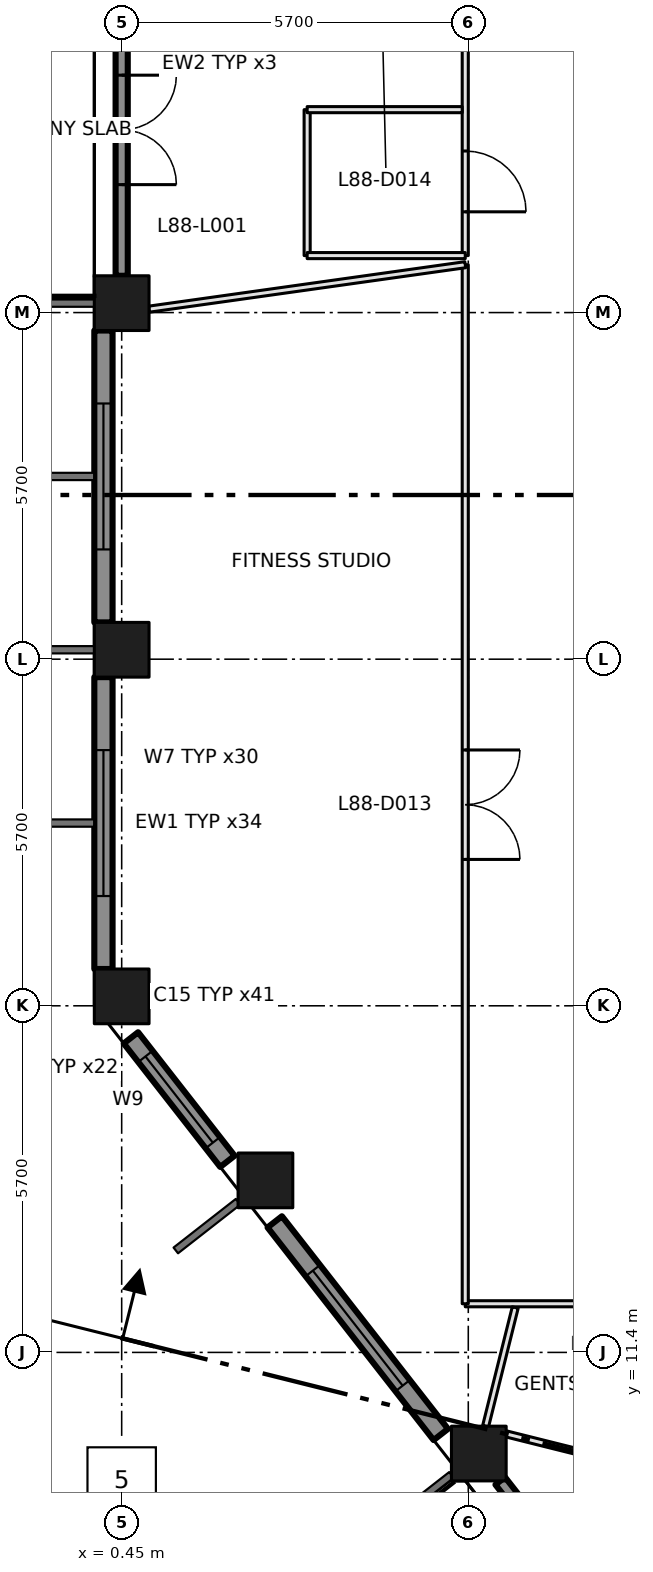
"""IFC4 building model, lengths in metres.
Left out: names, types, materials, properties, quantities, classifications, styles, units other than length and angle.
Written with IfcOpenShell. Run it as: python <this file> out.ifc"""

import sys

from ifc_helpers import new_model, si_unit, direction, frame, frame_2d, origin, origin_2d, place, context, subcontext, project, spatial, rectangle, extrude, element, fill, save


model = new_model("IFC4")
c1 = context("Model", 3, precision=1e-05, world=origin(), true_north=direction((0.0, 1.0)))
c2 = subcontext(c1, "Body", "Model", "MODEL_VIEW")
j1 = project(units=[si_unit("LENGTHUNIT", "METRE"), si_unit("PLANEANGLEUNIT", "RADIAN")], contexts=[c1])
p1 = place(None, origin())
s1 = spatial("IfcSite", under=j1, at=p1, CompositionType="ELEMENT")
p2 = place(p1, origin())
s2 = spatial("IfcBuilding", under=s1, at=p2, CompositionType="ELEMENT")
p3 = place(p2, frame((0.0, 0.0, 383.4)))
s3 = spatial("IfcBuildingStorey", under=s2, at=p3, CompositionType="ELEMENT", Elevation=383.4)
for number, where, z_axis, x_axis in (
    (1, (0.45, 17.255, 0.0), (0.0, 0.0, 1.0), (1.0, 0.0, 0.0)),
    (2, (0.45, 22.955, 0.0), (0.0, 0.0, 1.0), (1.0, 0.0, 0.0)),
    (3, (0.45, 28.655, 0.0), (0.0, 0.0, 1.0), (1.0, 0.0, 0.0)),
    (4, (6.323, 9.737, 0.0), (0.0, 0.0, 1.0), (1.0, 0.0, 0.0)),
    (5, (2.814, 14.229, 0.0), (0.0, 0.0, 1.0), (1.0, 0.0, 0.0)),
):
    element("IfcColumn", number, at=place(p3, frame(where, z_axis=z_axis, x_axis=x_axis)), inside=s3, PredefinedType="COLUMN", context=c2, shape_type="SweptSolid", body=[
        extrude(rectangle(XDim=0.9, YDim=0.9, at=origin_2d()), origin(), (0.0, 0.0, 1.0), 4.2),
    ])
p4 = place(p3, frame((0.45, 33.904, 0.0), z_axis=(0.0, 0.0, 1.0), x_axis=(0.0, -1.0, 0.0)))
e6 = element("IfcWall", 6, at=p4, inside=s3, PredefinedType="SOLIDWALL", context=c2, shape_type="SweptSolid", body=[
    extrude(rectangle(XDim=4.799, YDim=0.2, at=frame_2d((2.399, 0.0))), origin(), (0.0, 0.0, 1.0), 3.2),
])
p5 = place(p4, frame((1.5, 0.0, 0.0)))
e7 = element("IfcOpeningElement", 7, at=p5, cuts=e6, PredefinedType="OPENING", context=c2, shape_type="SweptSolid", body=[
    extrude(rectangle(XDim=1.8, YDim=2.9, at=frame_2d((0.9, 1.45))), frame((0.0, 0.11, 0.0), z_axis=(0.0, -1.0, 0.0), x_axis=(1.0, 0.0, 0.0)), (0.0, 0.0, 1.0), 0.22),
])
p6 = place(p3, frame((-0.88, 34.185, 0.0), z_axis=(0.0, 0.0, 1.0), x_axis=(0.0, -1.0, 0.0)))
e8 = element("IfcWall", 8, at=p6, inside=s3, PredefinedType="SOLIDWALL", context=c2, shape_type="SweptSolid", body=[
    extrude(rectangle(XDim=5.36, YDim=0.4, at=frame_2d((2.68, 0.0))), origin(), (0.0, 0.0, 1.0), 0.3),
])
p7 = place(p3, frame((0.15, 28.205, 0.0), z_axis=(0.0, 0.0, 1.0), x_axis=(0.0, -1.0, 0.0)))
e9 = element("IfcWall", 9, at=p7, inside=s3, PredefinedType="SOLIDWALL", context=c2, shape_type="SweptSolid", body=[
    extrude(rectangle(XDim=4.8, YDim=0.3, at=frame_2d((2.4, 0.0))), origin(), (0.0, 0.0, 1.0), 3.2),
])
p8 = place(p7, frame((1.2, 0.0, 0.8)))
e10 = element("IfcOpeningElement", 10, at=p8, cuts=e9, PredefinedType="OPENING", context=c2, shape_type="SweptSolid", body=[
    extrude(rectangle(XDim=2.4, YDim=2.1, at=frame_2d((1.2, 1.05))), frame((0.0, 0.16, 0.0), z_axis=(0.0, -1.0, 0.0), x_axis=(1.0, 0.0, 0.0)), (0.0, 0.0, 1.0), 0.32),
])
p9 = place(p3, frame((0.15, 22.505, 0.0), z_axis=(0.0, 0.0, 1.0), x_axis=(0.0, -1.0, 0.0)))
e11 = element("IfcWall", 11, at=p9, inside=s3, PredefinedType="SOLIDWALL", context=c2, shape_type="SweptSolid", body=[
    extrude(rectangle(XDim=4.8, YDim=0.3, at=frame_2d((2.4, 0.0))), origin(), (0.0, 0.0, 1.0), 3.2),
])
p10 = place(p9, frame((1.2, 0.0, 0.8)))
e12 = element("IfcOpeningElement", 12, at=p10, cuts=e11, PredefinedType="OPENING", context=c2, shape_type="SweptSolid", body=[
    extrude(rectangle(XDim=2.4, YDim=2.1, at=frame_2d((1.2, 1.05))), frame((0.0, 0.16, 0.0), z_axis=(0.0, -1.0, 0.0), x_axis=(1.0, 0.0, 0.0)), (0.0, 0.0, 1.0), 0.32),
])
p11 = place(p3, frame((0.602, 16.573, 0.0), z_axis=(0.0, 0.0, 1.0), x_axis=(0.61568999437, -0.787988471256, 0.0)))
e13 = element("IfcWall", 13, at=p11, inside=s3, PredefinedType="SOLIDWALL", context=c2, shape_type="SweptSolid", body=[
    extrude(rectangle(XDim=2.577, YDim=0.3, at=frame_2d((1.289, 0.0))), origin(), (0.0, 0.0, 1.0), 3.2),
])
p12 = place(p11, frame((0.388, 0.0, 0.8)))
e14 = element("IfcOpeningElement", 14, at=p12, cuts=e13, PredefinedType="OPENING", context=c2, shape_type="SweptSolid", body=[
    extrude(rectangle(XDim=1.8, YDim=2.1, at=frame_2d((0.9, 1.05))), frame((0.0, 0.16, 0.0), z_axis=(0.0, -1.0, 0.0), x_axis=(1.0, 0.0, 0.0)), (0.0, 0.0, 1.0), 0.32),
])
p13 = place(p3, frame((2.967, 13.547, 0.0), z_axis=(0.0, 0.0, 1.0), x_axis=(0.615486001463, -0.788147817356, 0.0)))
e15 = element("IfcWall", 15, at=p13, inside=s3, PredefinedType="SOLIDWALL", context=c2, shape_type="SweptSolid", body=[
    extrude(rectangle(XDim=4.437, YDim=0.3, at=frame_2d((2.219, 0.0))), origin(), (0.0, 0.0, 1.0), 3.2),
])
p14 = place(p13, frame((1.018, 0.0, 0.8)))
e16 = element("IfcOpeningElement", 16, at=p14, cuts=e15, PredefinedType="OPENING", context=c2, shape_type="SweptSolid", body=[
    extrude(rectangle(XDim=2.4, YDim=2.1, at=frame_2d((1.2, 1.05))), frame((0.0, 0.16, 0.0), z_axis=(0.0, -1.0, 0.0), x_axis=(1.0, 0.0, 0.0)), (0.0, 0.0, 1.0), 0.32),
])
p15 = place(p3, frame((6.675, 9.287, 0.0), z_axis=(0.0, 0.0, 1.0), x_axis=(0.615593109271, -0.788064162247, 0.0)))
e17 = element("IfcWall", 17, at=p15, inside=s3, PredefinedType="SOLIDWALL", context=c2, shape_type="SweptSolid", body=[
    extrude(rectangle(XDim=4.558, YDim=0.2, at=frame_2d((2.279, 0.0))), origin(), (0.0, 0.0, 1.0), 3.2),
])
p16 = place(p15, frame((1.378, 0.0, 0.0)))
e18 = element("IfcOpeningElement", 18, at=p16, cuts=e17, PredefinedType="OPENING", context=c2, shape_type="SweptSolid", body=[
    extrude(rectangle(XDim=1.8, YDim=2.9, at=frame_2d((0.9, 1.45))), frame((0.0, 0.11, 0.0), z_axis=(0.0, -1.0, 0.0), x_axis=(1.0, 0.0, 0.0)), (0.0, 0.0, 1.0), 0.22),
])
p17 = place(p3, frame((6.1, 12.2, 0.0), z_axis=(0.0, 0.0, 1.0), x_axis=(1.0, 0.0, 0.0)))
e19 = element("IfcWall", 19, at=p17, inside=s3, PredefinedType="PARTITIONING", context=c2, shape_type="SweptSolid", body=[
    extrude(rectangle(XDim=3.8, YDim=0.1, at=frame_2d((1.9, 0.0))), origin(), (0.0, 0.0, 1.0), 3.9),
])
p18 = place(p17, frame((2.002, 0.0, 0.0)))
e20 = element("IfcOpeningElement", 20, at=p18, cuts=e19, PredefinedType="OPENING", context=c2, shape_type="SweptSolid", body=[
    extrude(rectangle(XDim=1.0, YDim=2.1, at=frame_2d((0.5, 1.05))), frame((0.0, 0.06, 0.0), z_axis=(0.0, -1.0, 0.0), x_axis=(1.0, 0.0, 0.0)), (0.0, 0.0, 1.0), 0.12),
])
p19 = place(p3, frame((6.1, 29.287, 0.0), z_axis=(0.0, 0.0, 1.0), x_axis=(0.0, -1.0, 0.0)))
e21 = element("IfcWall", 21, at=p19, inside=s3, PredefinedType="PARTITIONING", context=c2, shape_type="SweptSolid", body=[
    extrude(rectangle(XDim=17.087, YDim=0.1, at=frame_2d((8.543, 0.0))), origin(), (0.0, 0.0, 1.0), 3.9),
])
p20 = place(p19, frame((7.98, 0.0, 0.0)))
e22 = element("IfcOpeningElement", 22, at=p20, cuts=e21, PredefinedType="OPENING", context=c2, shape_type="SweptSolid", body=[
    extrude(rectangle(XDim=1.8, YDim=2.1, at=frame_2d((0.9, 1.05))), frame((0.0, 0.06, 0.0), z_axis=(0.0, -1.0, 0.0), x_axis=(1.0, 0.0, 0.0)), (0.0, 0.0, 1.0), 0.12),
])
p21 = place(p3, frame((6.1, 38.9, 0.0), z_axis=(0.0, 0.0, 1.0), x_axis=(0.0, -1.0, 0.0)))
e23 = element("IfcWall", 23, at=p21, inside=s3, PredefinedType="PARTITIONING", context=c2, shape_type="SweptSolid", body=[
    extrude(rectangle(XDim=9.463, YDim=0.1, at=frame_2d((4.731, 0.0))), origin(), (0.0, 0.0, 1.0), 3.9),
])
p22 = place(p21, frame((7.743, 0.0, 0.0)))
e24 = element("IfcOpeningElement", 24, at=p22, cuts=e23, PredefinedType="OPENING", context=c2, shape_type="SweptSolid", body=[
    extrude(rectangle(XDim=1.0, YDim=2.1, at=frame_2d((0.5, 1.05))), frame((0.0, 0.06, 0.0), z_axis=(0.0, -1.0, 0.0), x_axis=(1.0, 0.0, 0.0)), (0.0, 0.0, 1.0), 0.12),
])
p23 = place(p3, frame((3.5, 29.437, 0.0), z_axis=(0.0, 0.0, 1.0), x_axis=(0.0, 1.0, 0.0)))
e25 = element("IfcWall", 25, at=p23, inside=s3, PredefinedType="PARTITIONING", context=c2, shape_type="SweptSolid", body=[
    extrude(rectangle(XDim=2.4, YDim=0.1, at=frame_2d((1.2, 0.0))), origin(), (0.0, 0.0, 1.0), 3.9),
])
p24 = place(p3, frame((3.5, 31.837, 0.0), z_axis=(0.0, 0.0, 1.0), x_axis=(1.0, 0.0, 0.0)))
e26 = element("IfcWall", 26, at=p24, inside=s3, PredefinedType="PARTITIONING", context=c2, shape_type="SweptSolid", body=[
    extrude(rectangle(XDim=2.55, YDim=0.1, at=frame_2d((1.275, 0.0))), origin(), (0.0, 0.0, 1.0), 3.9),
])
p25 = place(p3, frame((6.1, 29.287, 0.0), z_axis=(0.0, 0.0, 1.0), x_axis=(-0.990258582179, -0.139240584677, 0.0)))
e27 = element("IfcWall", 27, at=p25, inside=s3, PredefinedType="PARTITIONING", context=c2, shape_type="SweptSolid", body=[
    extrude(rectangle(XDim=5.251, YDim=0.1, at=frame_2d((2.626, 0.0))), origin(), (0.0, 0.0, 1.0), 3.9),
])
p26 = place(p3, frame((6.1, 29.437, 0.0), z_axis=(0.0, 0.0, 1.0), x_axis=(-1.0, 0.0, 0.0)))
e28 = element("IfcWall", 28, at=p26, inside=s3, PredefinedType="PARTITIONING", context=c2, shape_type="SweptSolid", body=[
    extrude(rectangle(XDim=2.6, YDim=0.1, at=frame_2d((1.3, 0.0))), origin(), (0.0, 0.0, 1.0), 3.9),
])
p27 = place(p3, frame((6.922, 12.138, 0.0), z_axis=(0.0, 0.0, 1.0), x_axis=(-0.24222136375, -0.97022101139, 0.0)))
e29 = element("IfcWall", 29, at=p27, inside=s3, PredefinedType="PARTITIONING", context=c2, shape_type="SweptSolid", body=[
    extrude(rectangle(XDim=2.011, YDim=0.1, at=frame_2d((1.005, 0.0))), origin(), (0.0, 0.0, 1.0), 3.9),
])
p28 = place(p3, frame((8.72, 9.574, 0.0), z_axis=(0.0, 0.0, 1.0), x_axis=(-0.970221168815, 0.24222073318, 0.0)))
e30 = element("IfcWall", 30, at=p28, inside=s3, PredefinedType="PARTITIONING", context=c2, shape_type="SweptSolid", body=[
    extrude(rectangle(XDim=2.007, YDim=0.1, at=frame_2d((1.003, 0.0))), origin(), (0.0, 0.0, 1.0), 3.9),
])
p29 = place(p5, origin())
e31 = element("IfcDoor", 31, at=p29, inside=s3, OperationType="DOUBLE_DOOR_SINGLE_SWING", PredefinedType="DOOR", context=c2, shape_type="SweptSolid", body=[
    extrude(rectangle(XDim=1.8, YDim=2.9, at=frame_2d((0.9, 1.45))), frame((0.0, 0.025, 0.0), z_axis=(0.0, -1.0, 0.0), x_axis=(1.0, 0.0, 0.0)), (0.0, 0.0, 1.0), 0.05),
])
fill(e7, e31)
p30 = place(p8, origin())
e32 = element("IfcWindow", 32, at=p30, inside=s3, PartitioningType="DOUBLE_PANEL_VERTICAL", PredefinedType="WINDOW", context=c2, shape_type="SweptSolid", body=[
    extrude(rectangle(XDim=2.4, YDim=2.1, at=frame_2d((1.2, 1.05))), frame((0.0, 0.03, 0.0), z_axis=(0.0, -1.0, 0.0), x_axis=(1.0, 0.0, 0.0)), (0.0, 0.0, 1.0), 0.06),
])
fill(e10, e32)
p31 = place(p10, origin())
e33 = element("IfcWindow", 33, at=p31, inside=s3, PartitioningType="DOUBLE_PANEL_VERTICAL", PredefinedType="WINDOW", context=c2, shape_type="SweptSolid", body=[
    extrude(rectangle(XDim=2.4, YDim=2.1, at=frame_2d((1.2, 1.05))), frame((0.0, 0.03, 0.0), z_axis=(0.0, -1.0, 0.0), x_axis=(1.0, 0.0, 0.0)), (0.0, 0.0, 1.0), 0.06),
])
fill(e12, e33)
p32 = place(p12, origin())
e34 = element("IfcWindow", 34, at=p32, inside=s3, PartitioningType="DOUBLE_PANEL_VERTICAL", PredefinedType="WINDOW", context=c2, shape_type="SweptSolid", body=[
    extrude(rectangle(XDim=1.8, YDim=2.1, at=frame_2d((0.9, 1.05))), frame((0.0, 0.03, 0.0), z_axis=(0.0, -1.0, 0.0), x_axis=(1.0, 0.0, 0.0)), (0.0, 0.0, 1.0), 0.06),
])
fill(e14, e34)
p33 = place(p14, origin())
e35 = element("IfcWindow", 35, at=p33, inside=s3, PartitioningType="DOUBLE_PANEL_VERTICAL", PredefinedType="WINDOW", context=c2, shape_type="SweptSolid", body=[
    extrude(rectangle(XDim=2.4, YDim=2.1, at=frame_2d((1.2, 1.05))), frame((0.0, 0.03, 0.0), z_axis=(0.0, -1.0, 0.0), x_axis=(1.0, 0.0, 0.0)), (0.0, 0.0, 1.0), 0.06),
])
fill(e16, e35)
p34 = place(p20, origin())
e36 = element("IfcDoor", 36, at=p34, inside=s3, OperationType="DOUBLE_DOOR_SINGLE_SWING", PredefinedType="DOOR", context=c2, shape_type="SweptSolid", body=[
    extrude(rectangle(XDim=1.8, YDim=2.1, at=frame_2d((0.9, 1.05))), frame((0.0, 0.025, 0.0), z_axis=(0.0, -1.0, 0.0), x_axis=(1.0, 0.0, 0.0)), (0.0, 0.0, 1.0), 0.05),
])
fill(e22, e36)
p35 = place(p22, origin())
e37 = element("IfcDoor", 37, at=p35, inside=s3, OperationType="SINGLE_SWING_RIGHT", PredefinedType="DOOR", context=c2, shape_type="SweptSolid", body=[
    extrude(rectangle(XDim=1.0, YDim=2.1, at=frame_2d((0.5, 1.05))), frame((0.0, 0.025, 0.0), z_axis=(0.0, -1.0, 0.0), x_axis=(1.0, 0.0, 0.0)), (0.0, 0.0, 1.0), 0.05),
])
fill(e24, e37)
save(model, sys.argv[1])
